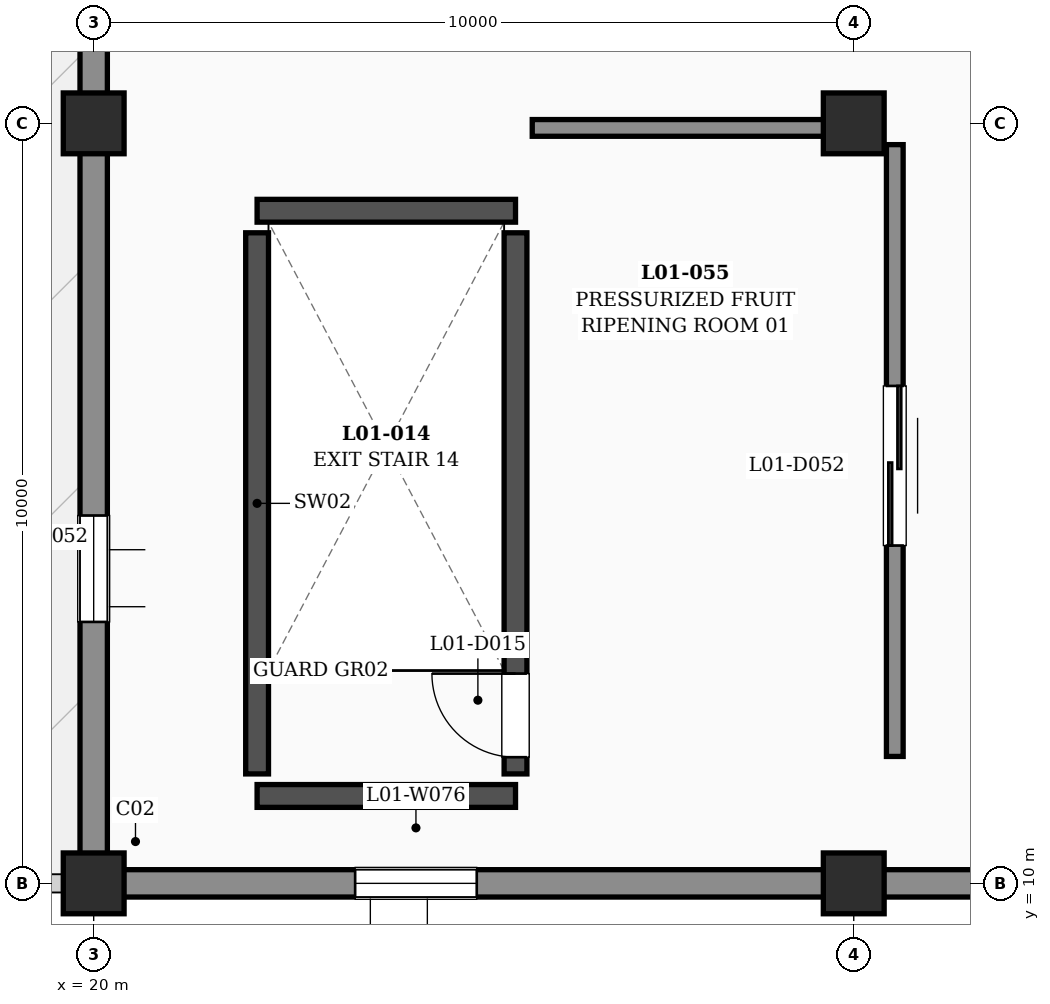
"""IFC4 building model, lengths in metres.
Left out: names, types, materials, properties, quantities, classifications, styles, units other than length and angle.
Written with IfcOpenShell. Run it as: python <this file> out.ifc"""

import sys

from ifc_helpers import new_model, si_unit, direction, frame, frame_2d, origin, origin_2d, place, context, subcontext, project, spatial, rectangle, extrude, element, fill, save


model = new_model("IFC4")
c1 = context("Model", 3, precision=1e-05, world=origin(), true_north=direction((0.0, 1.0)))
c2 = subcontext(c1, "Body", "Model", "MODEL_VIEW")
j1 = project(units=[si_unit("LENGTHUNIT", "METRE"), si_unit("PLANEANGLEUNIT", "RADIAN")], contexts=[c1])
p1 = place(None, origin())
s1 = spatial("IfcSite", under=j1, at=p1, CompositionType="ELEMENT")
p2 = place(p1, origin())
s2 = spatial("IfcBuilding", under=s1, at=p2, CompositionType="ELEMENT")
p3 = place(p2, frame((0.0, 0.0, 6.0)))
s3 = spatial("IfcBuildingStorey", under=s2, at=p3, CompositionType="ELEMENT", Elevation=6.0)
for number, where, z_axis, x_axis in (
    (1, (20.0, 10.0, 0.0), (0.0, 0.0, 1.0), (1.0, 0.0, 0.0)),
    (2, (20.0, 20.0, 0.0), (0.0, 0.0, 1.0), (1.0, 0.0, 0.0)),
    (3, (30.0, 10.0, 0.0), (0.0, 0.0, 1.0), (1.0, 0.0, 0.0)),
    (4, (30.0, 20.0, 0.0), (0.0, 0.0, 1.0), (1.0, 0.0, 0.0)),
):
    element("IfcColumn", number, at=place(p3, frame(where, z_axis=z_axis, x_axis=x_axis)), inside=s3, PredefinedType="COLUMN", context=c2, shape_type="SweptSolid", body=[
        extrude(rectangle(XDim=0.8, YDim=0.8, at=origin_2d()), origin(), (0.0, 0.0, 1.0), 4.8),
    ])
p4 = place(p3, frame((10.24, 10.0, 0.0), z_axis=(0.0, 0.0, 1.0), x_axis=(1.0, 0.0, 0.0)))
e5 = element("IfcWall", 5, at=p4, inside=s3, PredefinedType="PARAPET", context=c2, shape_type="SweptSolid", body=[
    extrude(rectangle(XDim=9.52, YDim=0.24, at=frame_2d((4.76, 0.0))), origin(), (0.0, 0.0, 1.0), 1.1),
])
p5 = place(p3, frame((20.0, 10.24, 0.0), z_axis=(0.0, 0.0, 1.0), x_axis=(0.0, 1.0, 0.0)))
e6 = element("IfcWall", 6, at=p5, inside=s3, PredefinedType="SOLIDWALL", context=c2, shape_type="SweptSolid", body=[
    extrude(rectangle(XDim=9.52, YDim=0.36, at=frame_2d((4.76, 0.0))), origin(), (0.0, 0.0, 1.0), 3.61),
])
p6 = place(p5, frame((3.2, 0.0, 1.2)))
e7 = element("IfcOpeningElement", 7, at=p6, cuts=e6, PredefinedType="OPENING", context=c2, shape_type="SweptSolid", body=[
    extrude(rectangle(XDim=1.4, YDim=1.35, at=frame_2d((0.7, 0.675))), frame((0.0, 0.19, 0.0), z_axis=(0.0, -1.0, 0.0), x_axis=(1.0, 0.0, 0.0)), (0.0, 0.0, 1.0), 0.38),
])
p7 = place(p3, frame((20.0, 20.24, 0.0), z_axis=(0.0, 0.0, 1.0), x_axis=(0.0, 1.0, 0.0)))
e8 = element("IfcWall", 8, at=p7, inside=s3, PredefinedType="SOLIDWALL", context=c2, shape_type="SweptSolid", body=[
    extrude(rectangle(XDim=9.52, YDim=0.36, at=frame_2d((4.76, 0.0))), origin(), (0.0, 0.0, 1.0), 3.61),
])
p8 = place(p7, frame((3.2, 0.0, 1.2)))
e9 = element("IfcOpeningElement", 9, at=p8, cuts=e8, PredefinedType="OPENING", context=c2, shape_type="SweptSolid", body=[
    extrude(rectangle(XDim=1.4, YDim=1.35, at=frame_2d((0.7, 0.675))), frame((0.0, 0.19, 0.0), z_axis=(0.0, -1.0, 0.0), x_axis=(1.0, 0.0, 0.0)), (0.0, 0.0, 1.0), 0.38),
])
p9 = place(p3, frame((20.24, 10.0, 0.0), z_axis=(0.0, 0.0, 1.0), x_axis=(1.0, 0.0, 0.0)))
e10 = element("IfcWall", 10, at=p9, inside=s3, PredefinedType="SOLIDWALL", context=c2, shape_type="SweptSolid", body=[
    extrude(rectangle(XDim=9.52, YDim=0.36, at=frame_2d((4.76, 0.0))), origin(), (0.0, 0.0, 1.0), 3.51),
])
p10 = place(p9, frame((3.2, 0.0, 1.15)))
e11 = element("IfcOpeningElement", 11, at=p10, cuts=e10, PredefinedType="OPENING", context=c2, shape_type="SweptSolid", body=[
    extrude(rectangle(XDim=1.6, YDim=1.5, at=frame_2d((0.8, 0.75))), frame((0.0, 0.19, 0.0), z_axis=(0.0, -1.0, 0.0), x_axis=(1.0, 0.0, 0.0)), (0.0, 0.0, 1.0), 0.38),
])
p11 = place(p3, frame((30.24, 10.0, 0.0), z_axis=(0.0, 0.0, 1.0), x_axis=(1.0, 0.0, 0.0)))
e12 = element("IfcWall", 12, at=p11, inside=s3, PredefinedType="SOLIDWALL", context=c2, shape_type="SweptSolid", body=[
    extrude(rectangle(XDim=9.52, YDim=0.36, at=frame_2d((4.76, 0.0))), origin(), (0.0, 0.0, 1.0), 3.51),
])
p12 = place(p11, frame((3.2, 0.0, 1.15)))
e13 = element("IfcOpeningElement", 13, at=p12, cuts=e12, PredefinedType="OPENING", context=c2, shape_type="SweptSolid", body=[
    extrude(rectangle(XDim=1.6, YDim=1.5, at=frame_2d((0.8, 0.75))), frame((0.0, 0.19, 0.0), z_axis=(0.0, -1.0, 0.0), x_axis=(1.0, 0.0, 0.0)), (0.0, 0.0, 1.0), 0.38),
])
for number, where, z_axis, x_axis in (
    (14, (22.15, 11.15, 0.0), (0.0, 0.0, 1.0), (1.0, 0.0, 0.0)),
    (15, (22.15, 18.85, 0.0), (0.0, 0.0, 1.0), (1.0, 0.0, 0.0)),
):
    element("IfcWall", number, at=place(p3, frame(where, z_axis=z_axis, x_axis=x_axis)), inside=s3, PredefinedType="SHEAR", context=c2, shape_type="SweptSolid", body=[
        extrude(rectangle(XDim=3.4, YDim=0.3, at=frame_2d((1.7, 0.0))), origin(), (0.0, 0.0, 1.0), 4.8),
    ])
p13 = place(p3, frame((22.15, 11.44, 0.0), z_axis=(0.0, 0.0, 1.0), x_axis=(0.0, 1.0, 0.0)))
e16 = element("IfcWall", 16, at=p13, inside=s3, PredefinedType="SHEAR", context=c2, shape_type="SweptSolid", body=[
    extrude(rectangle(XDim=7.12, YDim=0.3, at=frame_2d((3.56, 0.0))), origin(), (0.0, 0.0, 1.0), 4.8),
])
p14 = place(p3, frame((25.55, 11.44, 0.0), z_axis=(0.0, 0.0, 1.0), x_axis=(0.0, 1.0, 0.0)))
e17 = element("IfcWall", 17, at=p14, inside=s3, PredefinedType="SHEAR", context=c2, shape_type="SweptSolid", body=[
    extrude(rectangle(XDim=7.12, YDim=0.3, at=frame_2d((3.56, 0.0))), origin(), (0.0, 0.0, 1.0), 4.8),
])
p15 = place(p14, frame((0.22, 0.0, 0.0)))
e18 = element("IfcOpeningElement", 18, at=p15, cuts=e17, PredefinedType="OPENING", context=c2, shape_type="SweptSolid", body=[
    extrude(rectangle(XDim=1.1, YDim=2.2, at=frame_2d((0.55, 1.1))), frame((0.0, 0.16, 0.0), z_axis=(0.0, -1.0, 0.0), x_axis=(1.0, 0.0, 0.0)), (0.0, 0.0, 1.0), 0.32),
])
p16 = place(p3, frame((25.77, 19.94, 0.0), z_axis=(0.0, 0.0, 1.0), x_axis=(1.0, 0.0, 0.0)))
e19 = element("IfcWall", 19, at=p16, inside=s3, PredefinedType="PARTITIONING", context=c2, shape_type="SweptSolid", body=[
    extrude(rectangle(XDim=4.55, YDim=0.22, at=frame_2d((2.275, 0.0))), origin(), (0.0, 0.0, 1.0), 3.51),
])
p17 = place(p3, frame((30.54, 19.72, 0.0), z_axis=(0.0, 0.0, 1.0), x_axis=(0.0, -1.0, 0.0)))
e20 = element("IfcWall", 20, at=p17, inside=s3, PredefinedType="PARTITIONING", context=c2, shape_type="SweptSolid", body=[
    extrude(rectangle(XDim=8.05, YDim=0.22, at=frame_2d((4.025, 0.0))), origin(), (0.0, 0.0, 1.0), 4.46),
])
p18 = place(p17, frame((3.175, 0.0, 0.0)))
e21 = element("IfcOpeningElement", 21, at=p18, cuts=e20, PredefinedType="OPENING", context=c2, shape_type="SweptSolid", body=[
    extrude(rectangle(XDim=2.1, YDim=2.4, at=frame_2d((1.05, 1.2))), frame((0.0, 0.12, 0.0), z_axis=(0.0, -1.0, 0.0), x_axis=(1.0, 0.0, 0.0)), (0.0, 0.0, 1.0), 0.24),
])
p19 = place(p6, origin())
e22 = element("IfcWindow", 22, at=p19, inside=s3, PartitioningType="SINGLE_PANEL", PredefinedType="WINDOW", context=c2, shape_type="SweptSolid", body=[
    extrude(rectangle(XDim=1.4, YDim=1.35, at=frame_2d((0.7, 0.675))), frame((0.0, 0.03, 0.0), z_axis=(0.0, -1.0, 0.0), x_axis=(1.0, 0.0, 0.0)), (0.0, 0.0, 1.0), 0.06),
])
fill(e7, e22)
p20 = place(p10, origin())
e23 = element("IfcWindow", 23, at=p20, inside=s3, PartitioningType="SINGLE_PANEL", PredefinedType="WINDOW", context=c2, shape_type="SweptSolid", body=[
    extrude(rectangle(XDim=1.6, YDim=1.5, at=frame_2d((0.8, 0.75))), frame((0.0, 0.03, 0.0), z_axis=(0.0, -1.0, 0.0), x_axis=(1.0, 0.0, 0.0)), (0.0, 0.0, 1.0), 0.06),
])
fill(e11, e23)
p21 = place(p15, origin())
e24 = element("IfcDoor", 24, at=p21, inside=s3, OperationType="SINGLE_SWING_RIGHT", PredefinedType="DOOR", context=c2, shape_type="SweptSolid", body=[
    extrude(rectangle(XDim=1.1, YDim=2.2, at=frame_2d((0.55, 1.1))), frame((0.0, 0.025, 0.0), z_axis=(0.0, -1.0, 0.0), x_axis=(1.0, 0.0, 0.0)), (0.0, 0.0, 1.0), 0.05),
])
fill(e18, e24)
p22 = place(p18, origin())
e25 = element("IfcDoor", 25, at=p22, inside=s3, OperationType="DOUBLE_DOOR_SLIDING", PredefinedType="DOOR", context=c2, shape_type="SweptSolid", body=[
    extrude(rectangle(XDim=2.1, YDim=2.4, at=frame_2d((1.05, 1.2))), frame((0.0, 0.025, 0.0), z_axis=(0.0, -1.0, 0.0), x_axis=(1.0, 0.0, 0.0)), (0.0, 0.0, 1.0), 0.05),
])
fill(e21, e25)
save(model, sys.argv[1])
